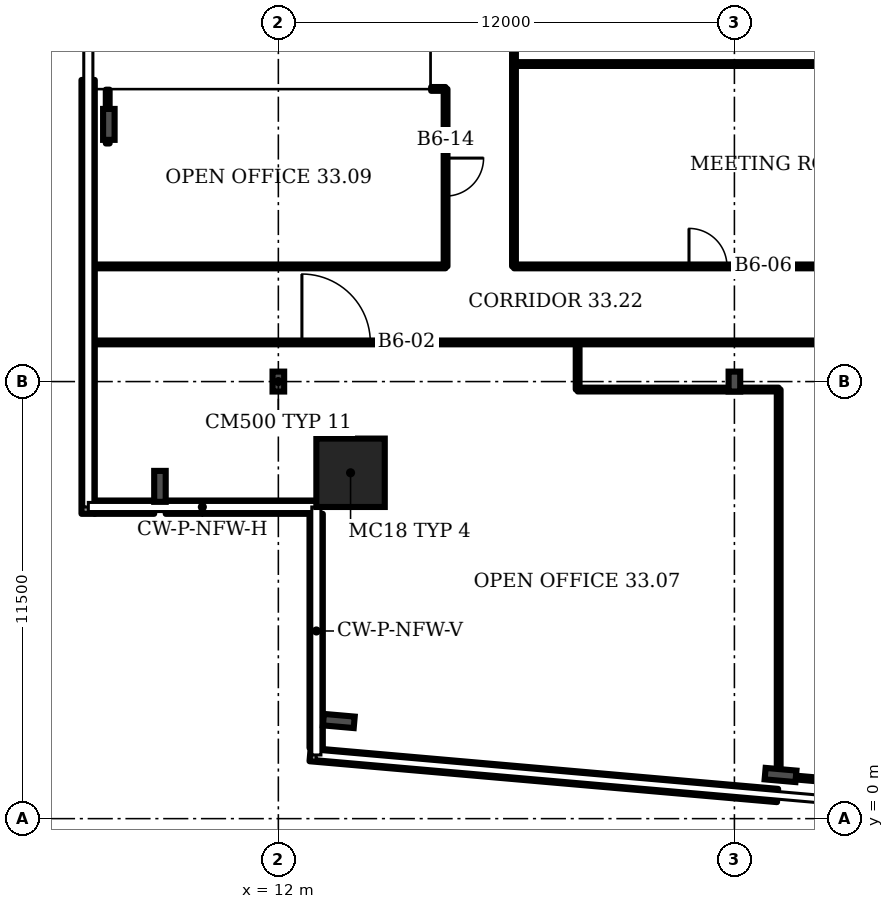
"""IFC4 building model, lengths in metres.
Left out: names, types, materials, properties, quantities, classifications, styles, units other than length and angle.
Written with IfcOpenShell. Run it as: python <this file> out.ifc"""

import sys

from ifc_helpers import new_model, si_unit, direction, frame, frame_2d, origin, origin_2d, place, context, subcontext, project, spatial, rectangle, i_section, extrude, element, fill, save


model = new_model("IFC4")
c1 = context("Model", 3, precision=1e-05, world=origin(), true_north=direction((0.0, 1.0)))
c2 = subcontext(c1, "Body", "Model", "MODEL_VIEW")
j1 = project(units=[si_unit("LENGTHUNIT", "METRE"), si_unit("PLANEANGLEUNIT", "RADIAN")], contexts=[c1])
p1 = place(None, origin())
s1 = spatial("IfcSite", under=j1, at=p1, CompositionType="ELEMENT")
p2 = place(p1, origin())
s2 = spatial("IfcBuilding", under=s1, at=p2, CompositionType="ELEMENT")
p3 = place(p2, frame((0.0, 0.0, 139.9)))
s3 = spatial("IfcBuildingStorey", under=s2, at=p3, CompositionType="ELEMENT", Elevation=139.9)
p4 = place(p3, frame((13.9, 9.1, 0.0), z_axis=(0.0, 0.0, 1.0), x_axis=(1.0, 0.0, 0.0)))
e1 = element("IfcColumn", 1, at=p4, inside=s3, PredefinedType="COLUMN", context=c2, shape_type="SweptSolid", body=[
    extrude(rectangle(XDim=1.8, YDim=1.8, at=origin_2d()), origin(), (0.0, 0.0, 1.0), 3.6),
])
for number, where, z_axis, x_axis in (
    (2, (13.591, 2.569, 0.0), (0.0, 0.0, 1.0), (-0.087, -0.996, 0.0)),
    (3, (25.214, 1.149, 0.0), (0.0, 0.0, 1.0), (-0.087, -0.996, 0.0)),
    (4, (7.54, 18.267, 0.0), (0.0, 0.0, 1.0), (-1.0, 0.0, 0.0)),
    (5, (8.885, 8.743, 0.0), (0.0, 0.0, 1.0), (-1.0, 0.0, 0.0)),
):
    element("IfcColumn", number, at=place(p3, frame(where, z_axis=z_axis, x_axis=x_axis)), inside=s3, PredefinedType="COLUMN", context=c2, shape_type="SweptSolid", body=[
        extrude(i_section(OverallWidth=0.303, OverallDepth=0.814, WebThickness=0.021, FlangeThickness=0.04, FilletRadius=0.03, at=origin_2d()), origin(), (0.0, 0.0, 1.0), 3.6),
    ])
for number, where, z_axis, x_axis in (
    (6, (12.0, 11.5, 0.0), (0.0, 0.0, 1.0), (1.0, 0.0, 0.0)),
    (7, (24.0, 11.5, 0.0), (0.0, 0.0, 1.0), (1.0, 0.0, 0.0)),
):
    element("IfcColumn", number, at=place(p3, frame(where, z_axis=z_axis, x_axis=x_axis)), inside=s3, PredefinedType="COLUMN", context=c2, shape_type="SweptSolid", body=[
        extrude(i_section(OverallWidth=0.306, OverallDepth=0.524, WebThickness=0.021, FlangeThickness=0.04, FilletRadius=0.027, at=origin_2d()), origin(), (0.0, 0.0, 1.0), 3.6),
    ])
p5 = place(p3, frame((12.835, 1.685, 0.0), z_axis=(0.0, 0.0, 1.0), x_axis=(0.996192, -0.087173, 0.0)))
e8 = element("IfcWall", 8, at=p5, inside=s3, PredefinedType="SOLIDWALL", context=c2, shape_type="SweptSolid", body=[
    extrude(rectangle(XDim=12.348, YDim=0.35, at=frame_2d((6.174, 0.0))), origin(), (0.0, 0.0, 1.0), 1.0),
])
p6 = place(p3, frame((6.995, 19.437, 0.0), z_axis=(0.0, 0.0, 1.0), x_axis=(0.0, -1.0, 0.0)))
e9 = element("IfcWall", 9, at=p6, inside=s3, PredefinedType="SOLIDWALL", context=c2, shape_type="SweptSolid", body=[
    extrude(rectangle(XDim=11.417, YDim=0.35, at=frame_2d((5.708, 0.0))), origin(), (0.0, 0.0, 1.0), 1.0),
])
p7 = place(p3, frame((7.17, 8.195, 0.0), z_axis=(0.0, 0.0, 1.0), x_axis=(1.0, 0.0, 0.0)))
e10 = element("IfcWall", 10, at=p7, inside=s3, PredefinedType="SOLIDWALL", context=c2, shape_type="SweptSolid", body=[
    extrude(rectangle(XDim=1.563, YDim=0.35, at=frame_2d((0.782, 0.0))), origin(), (0.0, 0.0, 1.0), 1.0),
])
p8 = place(p3, frame((9.036, 8.195, 0.0), z_axis=(0.0, 0.0, 1.0), x_axis=(1.0, 0.0, 0.0)))
e11 = element("IfcWall", 11, at=p8, inside=s3, PredefinedType="SOLIDWALL", context=c2, shape_type="SweptSolid", body=[
    extrude(rectangle(XDim=3.964, YDim=0.35, at=frame_2d((1.982, 0.0))), origin(), (0.0, 0.0, 1.0), 1.0),
])
p9 = place(p3, frame((12.995, 8.02, 0.0), z_axis=(0.0, 0.0, 1.0), x_axis=(0.0, -1.0, 0.0)))
e12 = element("IfcWall", 12, at=p9, inside=s3, PredefinedType="SOLIDWALL", context=c2, shape_type="SweptSolid", body=[
    extrude(rectangle(XDim=6.161, YDim=0.35, at=frame_2d((3.081, 0.0))), origin(), (0.0, 0.0, 1.0), 1.0),
])
p10 = place(p3, frame((7.02, 12.53, 0.0), z_axis=(0.0, 0.0, 1.0), x_axis=(1.0, 0.0, 0.0)))
e13 = element("IfcWall", 13, at=p10, inside=s3, PredefinedType="PARTITIONING", context=c2, shape_type="SweptSolid", body=[
    extrude(rectangle(XDim=35.44, YDim=0.1, at=frame_2d((17.72, 0.0))), origin(), (0.0, 0.0, 1.0), 3.2),
])
p11 = place(p10, frame((5.6, 0.0, 0.0)))
e14 = element("IfcOpeningElement", 14, at=p11, cuts=e13, PredefinedType="OPENING", context=c2, shape_type="SweptSolid", body=[
    extrude(rectangle(XDim=1.8, YDim=2.1, at=frame_2d((0.9, 1.05))), frame((0.0, 0.06, 0.0), z_axis=(0.0, -1.0, 0.0), x_axis=(1.0, 0.0, 0.0)), (0.0, 0.0, 1.0), 0.12),
])
p12 = place(p10, frame((25.675, 0.0, 0.0)))
e15 = element("IfcOpeningElement", 15, at=p12, cuts=e13, PredefinedType="OPENING", context=c2, shape_type="SweptSolid", body=[
    extrude(rectangle(XDim=1.0, YDim=2.1, at=frame_2d((0.5, 1.05))), frame((0.0, 0.06, 0.0), z_axis=(0.0, -1.0, 0.0), x_axis=(1.0, 0.0, 0.0)), (0.0, 0.0, 1.0), 0.12),
])
p13 = place(p3, frame((7.02, 14.53, 0.0), z_axis=(0.0, 0.0, 1.0), x_axis=(1.0, 0.0, 0.0)))
e16 = element("IfcWall", 16, at=p13, inside=s3, PredefinedType="PARTITIONING", context=c2, shape_type="SweptSolid", body=[
    extrude(rectangle(XDim=9.38, YDim=0.1, at=frame_2d((4.69, 0.0))), origin(), (0.0, 0.0, 1.0), 3.2),
])
p14 = place(p3, frame((7.51, 17.765, 0.0), z_axis=(0.0, 0.0, 1.0), x_axis=(0.0, 1.0, 0.0)))
e17 = element("IfcWall", 17, at=p14, inside=s3, PredefinedType="PARTITIONING", context=c2, shape_type="SweptSolid", body=[
    extrude(rectangle(XDim=1.415, YDim=0.1, at=frame_2d((0.708, 0.0))), origin(), (0.0, 0.0, 1.0), 2.58),
])
p15 = place(p3, frame((16.02, 19.2, 0.0), z_axis=(0.0, 0.0, 1.0), x_axis=(1.0, 0.0, 0.0)))
e18 = element("IfcWall", 18, at=p15, inside=s3, PredefinedType="PARTITIONING", context=c2, shape_type="SweptSolid", body=[
    extrude(rectangle(XDim=0.38, YDim=0.1, at=frame_2d((0.19, 0.0))), origin(), (0.0, 0.0, 1.0), 3.2),
])
p16 = place(p3, frame((16.4, 14.53, 0.0), z_axis=(0.0, 0.0, 1.0), x_axis=(0.0, 1.0, 0.0)))
e19 = element("IfcWall", 19, at=p16, inside=s3, PredefinedType="PARTITIONING", context=c2, shape_type="SweptSolid", body=[
    extrude(rectangle(XDim=4.67, YDim=0.1, at=frame_2d((2.335, 0.0))), origin(), (0.0, 0.0, 1.0), 3.2),
])
p17 = place(p16, frame((1.85, 0.0, 0.0)))
e20 = element("IfcOpeningElement", 20, at=p17, cuts=e19, PredefinedType="OPENING", context=c2, shape_type="SweptSolid", body=[
    extrude(rectangle(XDim=1.0, YDim=2.1, at=frame_2d((0.5, 1.05))), frame((0.0, 0.06, 0.0), z_axis=(0.0, -1.0, 0.0), x_axis=(1.0, 0.0, 0.0)), (0.0, 0.0, 1.0), 0.12),
])
p18 = place(p3, frame((18.2, 14.53, 0.0), z_axis=(0.0, 0.0, 1.0), x_axis=(0.0, 1.0, 0.0)))
e21 = element("IfcWall", 21, at=p18, inside=s3, PredefinedType="PARTITIONING", context=c2, shape_type="SweptSolid", body=[
    extrude(rectangle(XDim=7.02, YDim=0.1, at=frame_2d((3.51, 0.0))), origin(), (0.0, 0.0, 1.0), 3.2),
])
p19 = place(p18, frame((5.745, 0.0, 0.0)))
e22 = element("IfcOpeningElement", 22, at=p19, cuts=e21, PredefinedType="OPENING", context=c2, shape_type="SweptSolid", body=[
    extrude(rectangle(XDim=1.0, YDim=2.1, at=frame_2d((0.5, 1.05))), frame((0.0, 0.06, 0.0), z_axis=(0.0, -1.0, 0.0), x_axis=(1.0, 0.0, 0.0)), (0.0, 0.0, 1.0), 0.12),
])
p20 = place(p3, frame((18.2, 14.53, 0.0), z_axis=(0.0, 0.0, 1.0), x_axis=(1.0, 0.0, 0.0)))
e23 = element("IfcWall", 23, at=p20, inside=s3, PredefinedType="PARTITIONING", context=c2, shape_type="SweptSolid", body=[
    extrude(rectangle(XDim=68.41, YDim=0.1, at=frame_2d((34.205, 0.0))), origin(), (0.0, 0.0, 1.0), 3.2),
])
p21 = place(p20, frame((4.605, 0.0, 0.0)))
e24 = element("IfcOpeningElement", 24, at=p21, cuts=e23, PredefinedType="OPENING", context=c2, shape_type="SweptSolid", body=[
    extrude(rectangle(XDim=1.0, YDim=2.1, at=frame_2d((0.5, 1.05))), frame((0.0, 0.06, 0.0), z_axis=(0.0, -1.0, 0.0), x_axis=(1.0, 0.0, 0.0)), (0.0, 0.0, 1.0), 0.12),
])
p22 = place(p20, frame((23.88, 0.0, 0.0)))
e25 = element("IfcOpeningElement", 25, at=p22, cuts=e23, PredefinedType="OPENING", context=c2, shape_type="SweptSolid", body=[
    extrude(rectangle(XDim=1.0, YDim=2.1, at=frame_2d((0.5, 1.05))), frame((0.0, 0.06, 0.0), z_axis=(0.0, -1.0, 0.0), x_axis=(1.0, 0.0, 0.0)), (0.0, 0.0, 1.0), 0.12),
])
p23 = place(p20, frame((27.8, 0.0, 0.0)))
e26 = element("IfcOpeningElement", 26, at=p23, cuts=e23, PredefinedType="OPENING", context=c2, shape_type="SweptSolid", body=[
    extrude(rectangle(XDim=1.0, YDim=2.1, at=frame_2d((0.5, 1.05))), frame((0.0, 0.06, 0.0), z_axis=(0.0, -1.0, 0.0), x_axis=(1.0, 0.0, 0.0)), (0.0, 0.0, 1.0), 0.12),
])
p24 = place(p20, frame((31.8, 0.0, 0.0)))
e27 = element("IfcOpeningElement", 27, at=p24, cuts=e23, PredefinedType="OPENING", context=c2, shape_type="SweptSolid", body=[
    extrude(rectangle(XDim=1.0, YDim=2.1, at=frame_2d((0.5, 1.05))), frame((0.0, 0.06, 0.0), z_axis=(0.0, -1.0, 0.0), x_axis=(1.0, 0.0, 0.0)), (0.0, 0.0, 1.0), 0.12),
])
p25 = place(p20, frame((35.8, 0.0, 0.0)))
e28 = element("IfcOpeningElement", 28, at=p25, cuts=e23, PredefinedType="OPENING", context=c2, shape_type="SweptSolid", body=[
    extrude(rectangle(XDim=1.0, YDim=2.1, at=frame_2d((0.5, 1.05))), frame((0.0, 0.06, 0.0), z_axis=(0.0, -1.0, 0.0), x_axis=(1.0, 0.0, 0.0)), (0.0, 0.0, 1.0), 0.12),
])
p26 = place(p20, frame((41.355, 0.0, 0.0)))
e29 = element("IfcOpeningElement", 29, at=p26, cuts=e23, PredefinedType="OPENING", context=c2, shape_type="SweptSolid", body=[
    extrude(rectangle(XDim=1.0, YDim=2.1, at=frame_2d((0.5, 1.05))), frame((0.0, 0.06, 0.0), z_axis=(0.0, -1.0, 0.0), x_axis=(1.0, 0.0, 0.0)), (0.0, 0.0, 1.0), 0.12),
])
p27 = place(p20, frame((50.88, 0.0, 0.0)))
e30 = element("IfcOpeningElement", 30, at=p27, cuts=e23, PredefinedType="OPENING", context=c2, shape_type="SweptSolid", body=[
    extrude(rectangle(XDim=1.8, YDim=2.1, at=frame_2d((0.9, 1.05))), frame((0.0, 0.06, 0.0), z_axis=(0.0, -1.0, 0.0), x_axis=(1.0, 0.0, 0.0)), (0.0, 0.0, 1.0), 0.12),
])
p28 = place(p20, frame((62.796, 0.0, 0.0)))
e31 = element("IfcOpeningElement", 31, at=p28, cuts=e23, PredefinedType="OPENING", context=c2, shape_type="SweptSolid", body=[
    extrude(rectangle(XDim=1.0, YDim=2.1, at=frame_2d((0.5, 1.05))), frame((0.0, 0.06, 0.0), z_axis=(0.0, -1.0, 0.0), x_axis=(1.0, 0.0, 0.0)), (0.0, 0.0, 1.0), 0.12),
])
p29 = place(p3, frame((18.2, 19.855, 0.0), z_axis=(0.0, 0.0, 1.0), x_axis=(1.0, 0.0, 0.0)))
e32 = element("IfcWall", 32, at=p29, inside=s3, PredefinedType="PARTITIONING", context=c2, shape_type="SweptSolid", body=[
    extrude(rectangle(XDim=15.425, YDim=0.1, at=frame_2d((7.712, 0.0))), origin(), (0.0, 0.0, 1.0), 3.2),
])
p30 = place(p3, frame((19.875, 11.29, 0.0), z_axis=(0.0, 0.0, 1.0), x_axis=(0.0, 1.0, 0.0)))
e33 = element("IfcWall", 33, at=p30, inside=s3, PredefinedType="PARTITIONING", context=c2, shape_type="SweptSolid", body=[
    extrude(rectangle(XDim=1.24, YDim=0.1, at=frame_2d((0.62, 0.0))), origin(), (0.0, 0.0, 1.0), 3.2),
])
p31 = place(p3, frame((19.875, 11.29, 0.0), z_axis=(0.0, 0.0, 1.0), x_axis=(1.0, 0.0, 0.0)))
e34 = element("IfcWall", 34, at=p31, inside=s3, PredefinedType="PARTITIONING", context=c2, shape_type="SweptSolid", body=[
    extrude(rectangle(XDim=5.29, YDim=0.1, at=frame_2d((2.645, 0.0))), origin(), (0.0, 0.0, 1.0), 3.2),
])
p32 = place(p3, frame((25.165, 1.12, 0.0), z_axis=(0.0, 0.0, 1.0), x_axis=(0.0, 1.0, 0.0)))
e35 = element("IfcWall", 35, at=p32, inside=s3, PredefinedType="PARTITIONING", context=c2, shape_type="SweptSolid", body=[
    extrude(rectangle(XDim=10.17, YDim=0.1, at=frame_2d((5.085, 0.0))), origin(), (0.0, 0.0, 1.0), 3.2),
])
p33 = place(p3, frame((31.25, 0.59, 0.0), z_axis=(0.0, 0.0, 1.0), x_axis=(-0.996225, 0.086776, 0.0)))
e36 = element("IfcWall", 36, at=p33, inside=s3, PredefinedType="PARTITIONING", context=c2, shape_type="SweptSolid", body=[
    extrude(rectangle(XDim=6.108, YDim=0.1, at=frame_2d((3.054, 0.0))), origin(), (0.0, 0.0, 1.0), 2.58),
])
p34 = place(p11, origin())
e37 = element("IfcDoor", 37, at=p34, inside=s3, OperationType="DOUBLE_DOOR_SINGLE_SWING", PredefinedType="DOOR", context=c2, shape_type="SweptSolid", body=[
    extrude(rectangle(XDim=1.8, YDim=2.1, at=frame_2d((0.9, 1.05))), frame((0.0, 0.025, 0.0), z_axis=(0.0, -1.0, 0.0), x_axis=(1.0, 0.0, 0.0)), (0.0, 0.0, 1.0), 0.05),
])
fill(e14, e37)
p35 = place(p21, origin())
e38 = element("IfcDoor", 38, at=p35, inside=s3, OperationType="SINGLE_SWING_LEFT", PredefinedType="DOOR", context=c2, shape_type="SweptSolid", body=[
    extrude(rectangle(XDim=1.0, YDim=2.1, at=frame_2d((0.5, 1.05))), frame((0.0, 0.025, 0.0), z_axis=(0.0, -1.0, 0.0), x_axis=(1.0, 0.0, 0.0)), (0.0, 0.0, 1.0), 0.05),
])
fill(e24, e38)
p36 = place(p17, origin())
e39 = element("IfcDoor", 39, at=p36, inside=s3, OperationType="SINGLE_SWING_RIGHT", PredefinedType="DOOR", context=c2, shape_type="SweptSolid", body=[
    extrude(rectangle(XDim=1.0, YDim=2.1, at=frame_2d((0.5, 1.05))), frame((0.0, 0.025, 0.0), z_axis=(0.0, -1.0, 0.0), x_axis=(1.0, 0.0, 0.0)), (0.0, 0.0, 1.0), 0.05),
])
fill(e20, e39)
save(model, sys.argv[1])
